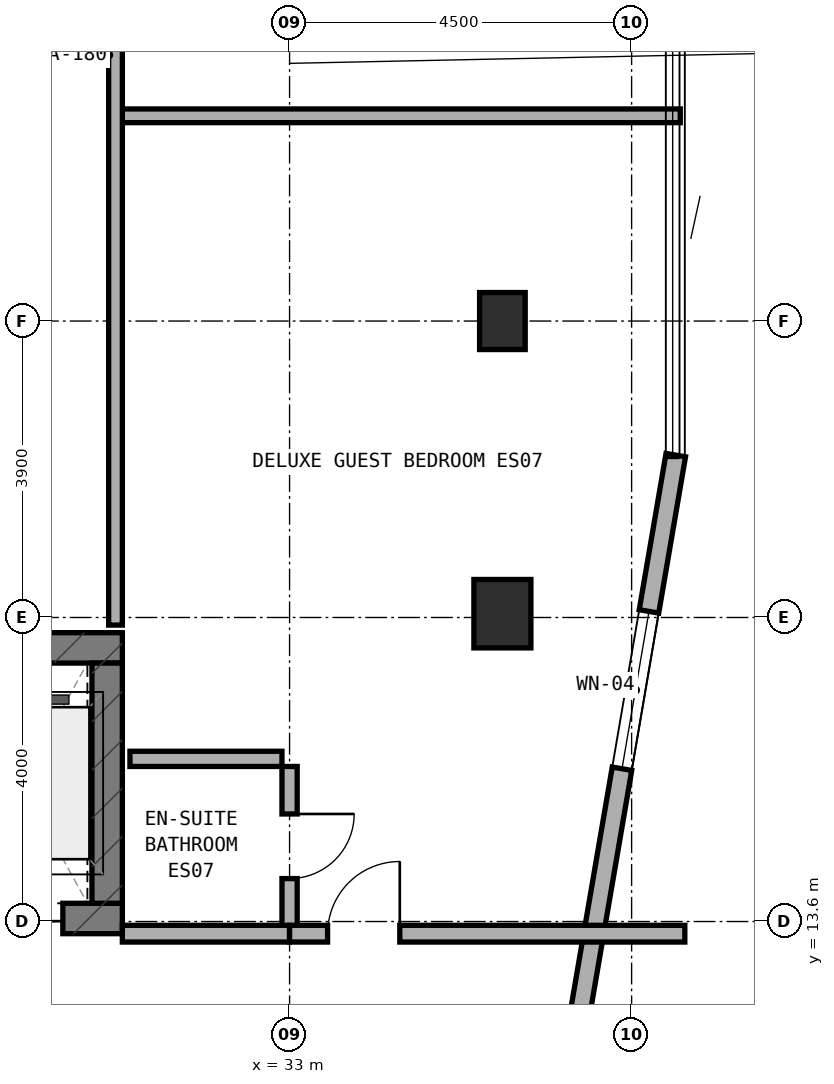
"""IFC4 building model, lengths in metres.
Left out: names, types, materials, properties, quantities, classifications, styles, units other than length and angle.
Written with IfcOpenShell. Run it as: python <this file> out.ifc"""

import sys

from ifc_helpers import new_model, si_unit, direction, frame, frame_2d, origin, origin_2d, place, context, subcontext, project, spatial, rectangle, extrude, element, fill, save


model = new_model("IFC4")
c1 = context("Model", 3, precision=1e-05, world=origin(), true_north=direction((0.0, 1.0)))
c2 = subcontext(c1, "Body", "Model", "MODEL_VIEW")
j1 = project(units=[si_unit("LENGTHUNIT", "METRE"), si_unit("PLANEANGLEUNIT", "RADIAN")], contexts=[c1])
p1 = place(None, origin())
s1 = spatial("IfcSite", under=j1, at=p1, CompositionType="ELEMENT")
p2 = place(p1, origin())
s2 = spatial("IfcBuilding", under=s1, at=p2, CompositionType="ELEMENT")
p3 = place(p2, frame((0.0, 0.0, 257.6)))
s3 = spatial("IfcBuildingStorey", under=s2, at=p3, CompositionType="ELEMENT", Elevation=257.6)
p4 = place(p3, frame((6.4, 13.64, 0.0), z_axis=(0.0, 0.0, 1.0), x_axis=(1.0, 0.0, 0.0)))
e1 = element("IfcWall", 1, at=p4, inside=s3, PredefinedType="SHEAR", context=c2, shape_type="SweptSolid", body=[
    extrude(rectangle(XDim=24.4, YDim=0.4, at=frame_2d((12.2, 0.0))), origin(), (0.0, 0.0, 1.0), 3.6),
])
p5 = place(p4, frame((9.15, 0.0, 0.0)))
e2 = element("IfcOpeningElement", 2, at=p5, cuts=e1, PredefinedType="OPENING", context=c2, shape_type="SweptSolid", body=[
    extrude(rectangle(XDim=1.2, YDim=2.15, at=frame_2d((0.6, 1.075))), frame((0.0, 0.21, 0.0), z_axis=(0.0, -1.0, 0.0), x_axis=(1.0, 0.0, 0.0)), (0.0, 0.0, 1.0), 0.42),
])
p6 = place(p4, frame((16.94, 0.0, 0.0)))
e3 = element("IfcOpeningElement", 3, at=p6, cuts=e1, PredefinedType="OPENING", context=c2, shape_type="SweptSolid", body=[
    extrude(rectangle(XDim=0.85, YDim=2.1, at=frame_2d((0.425, 1.05))), frame((0.0, 0.21, 0.0), z_axis=(0.0, -1.0, 0.0), x_axis=(1.0, 0.0, 0.0)), (0.0, 0.0, 1.0), 0.42),
])
p7 = place(p4, frame((18.783, 0.0, 0.0)))
e4 = element("IfcOpeningElement", 4, at=p7, cuts=e1, PredefinedType="OPENING", context=c2, shape_type="SweptSolid", body=[
    extrude(rectangle(XDim=1.1, YDim=2.15, at=frame_2d((0.55, 1.075))), frame((0.0, 0.21, 0.0), z_axis=(0.0, -1.0, 0.0), x_axis=(1.0, 0.0, 0.0)), (0.0, 0.0, 1.0), 0.42),
])
p8 = place(p4, frame((20.65, 0.0, 0.0)))
e5 = element("IfcOpeningElement", 5, at=p8, cuts=e1, PredefinedType="OPENING", context=c2, shape_type="SweptSolid", body=[
    extrude(rectangle(XDim=1.1, YDim=2.15, at=frame_2d((0.55, 1.075))), frame((0.0, 0.21, 0.0), z_axis=(0.0, -1.0, 0.0), x_axis=(1.0, 0.0, 0.0)), (0.0, 0.0, 1.0), 0.42),
])
p9 = place(p4, frame((22.517, 0.0, 0.0)))
e6 = element("IfcOpeningElement", 6, at=p9, cuts=e1, PredefinedType="OPENING", context=c2, shape_type="SweptSolid", body=[
    extrude(rectangle(XDim=1.1, YDim=2.15, at=frame_2d((0.55, 1.075))), frame((0.0, 0.21, 0.0), z_axis=(0.0, -1.0, 0.0), x_axis=(1.0, 0.0, 0.0)), (0.0, 0.0, 1.0), 0.42),
])
p10 = place(p3, frame((6.4, 17.2, 0.0), z_axis=(0.0, 0.0, 1.0), x_axis=(1.0, 0.0, 0.0)))
e7 = element("IfcWall", 7, at=p10, inside=s3, PredefinedType="SHEAR", context=c2, shape_type="SweptSolid", body=[
    extrude(rectangle(XDim=24.4, YDim=0.4, at=frame_2d((12.2, 0.0))), origin(), (0.0, 0.0, 1.0), 3.6),
])
p11 = place(p3, frame((30.6, 13.84, 0.0), z_axis=(0.0, 0.0, 1.0), x_axis=(0.0, 1.0, 0.0)))
e8 = element("IfcWall", 8, at=p11, inside=s3, PredefinedType="SHEAR", context=c2, shape_type="SweptSolid", body=[
    extrude(rectangle(XDim=3.16, YDim=0.4, at=frame_2d((1.58, 0.0))), origin(), (0.0, 0.0, 1.0), 3.6),
])
p12 = place(p3, frame((35.8, 21.5, 0.0), z_axis=(0.0, 0.0, 1.0), x_axis=(1.0, 0.0, 0.0)))
e9 = element("IfcColumn", 9, at=p12, inside=s3, PredefinedType="COLUMN", context=c2, shape_type="SweptSolid", body=[
    extrude(rectangle(XDim=0.6, YDim=0.75, at=origin_2d()), origin(), (0.0, 0.0, 1.0), 3.6),
])
p13 = place(p3, frame((35.8, 17.65, 0.0), z_axis=(0.0, 0.0, 1.0), x_axis=(1.0, 0.0, 0.0)))
e10 = element("IfcColumn", 10, at=p13, inside=s3, PredefinedType="COLUMN", context=c2, shape_type="SweptSolid", body=[
    extrude(rectangle(XDim=0.75, YDim=0.9, at=origin_2d()), origin(), (0.0, 0.0, 1.0), 3.6),
])
p14 = place(p3, frame((36.671, 11.514, 0.0), z_axis=(0.0, 0.0, 1.0), x_axis=(0.169038545376, 0.985609440994, 0.0)))
e11 = element("IfcWall", 11, at=p14, inside=s3, PredefinedType="STANDARD", context=c2, shape_type="SweptSolid", body=[
    extrude(rectangle(XDim=8.342, YDim=0.26, at=frame_2d((4.171, 0.0))), origin(), (0.0, 0.0, 1.0), 3.32),
])
p15 = place(p14, frame((4.156, 0.0, 0.85)))
e12 = element("IfcOpeningElement", 12, at=p15, cuts=e11, PredefinedType="OPENING", context=c2, shape_type="SweptSolid", body=[
    extrude(rectangle(XDim=2.1, YDim=1.5, at=frame_2d((1.05, 0.75))), frame((0.0, 0.14, 0.0), z_axis=(0.0, -1.0, 0.0), x_axis=(1.0, 0.0, 0.0)), (0.0, 0.0, 1.0), 0.28),
])
p16 = place(p3, frame((30.8, 24.2, 0.0), z_axis=(0.0, 0.0, 1.0), x_axis=(1.0, 0.0, 0.0)))
e13 = element("IfcWall", 13, at=p16, inside=s3, PredefinedType="SOLIDWALL", context=c2, shape_type="SweptSolid", body=[
    extrude(rectangle(XDim=7.34, YDim=0.18, at=frame_2d((3.67, 0.0))), origin(), (0.0, 0.0, 1.0), 3.015),
])
p17 = place(p3, frame((30.71, 17.5, 0.0), z_axis=(0.0, 0.0, 1.0), x_axis=(0.0, 1.0, 0.0)))
e14 = element("IfcWall", 14, at=p17, inside=s3, PredefinedType="SOLIDWALL", context=c2, shape_type="SweptSolid", body=[
    extrude(rectangle(XDim=15.0, YDim=0.18, at=frame_2d((7.5, 0.0))), origin(), (0.0, 0.0, 1.0), 2.795),
])
p18 = place(p3, frame((33.0, 13.54, 0.0), z_axis=(0.0, 0.0, 1.0), x_axis=(0.0, 1.0, 0.0)))
e15 = element("IfcWall", 15, at=p18, inside=s3, PredefinedType="PLUMBINGWALL", context=c2, shape_type="SweptSolid", body=[
    extrude(rectangle(XDim=2.1, YDim=0.2, at=frame_2d((1.05, 0.0))), origin(), (0.0, 0.0, 1.0), 3.32),
])
p19 = place(p18, frame((0.625, 0.0, 0.0)))
e16 = element("IfcOpeningElement", 16, at=p19, cuts=e15, PredefinedType="OPENING", context=c2, shape_type="SweptSolid", body=[
    extrude(rectangle(XDim=0.85, YDim=2.1, at=frame_2d((0.425, 1.05))), frame((0.0, 0.11, 0.0), z_axis=(0.0, -1.0, 0.0), x_axis=(1.0, 0.0, 0.0)), (0.0, 0.0, 1.0), 0.22),
])
p20 = place(p3, frame((30.9, 15.74, 0.0), z_axis=(0.0, 0.0, 1.0), x_axis=(1.0, 0.0, 0.0)))
e17 = element("IfcWall", 17, at=p20, inside=s3, PredefinedType="PLUMBINGWALL", context=c2, shape_type="SweptSolid", body=[
    extrude(rectangle(XDim=2.0, YDim=0.2, at=frame_2d((1.0, 0.0))), origin(), (0.0, 0.0, 1.0), 3.32),
])
p21 = place(p3, frame((30.8, 13.44, 0.0), z_axis=(0.0, 0.0, 1.0), x_axis=(1.0, 0.0, 0.0)))
e18 = element("IfcWall", 18, at=p21, inside=s3, PredefinedType="SOLIDWALL", context=c2, shape_type="SweptSolid", body=[
    extrude(rectangle(XDim=2.2, YDim=0.22, at=frame_2d((1.1, 0.0))), origin(), (0.0, 0.0, 1.0), 3.32),
])
p22 = place(p3, frame((33.0, 13.44, 0.0), z_axis=(0.0, 0.0, 1.0), x_axis=(1.0, 0.0, 0.0)))
e19 = element("IfcWall", 19, at=p22, inside=s3, PredefinedType="SOLIDWALL", context=c2, shape_type="SweptSolid", body=[
    extrude(rectangle(XDim=5.2, YDim=0.22, at=frame_2d((2.6, 0.0))), origin(), (0.0, 0.0, 1.0), 2.795),
])
p23 = place(p22, frame((0.5, 0.0, 0.0)))
e20 = element("IfcOpeningElement", 20, at=p23, cuts=e19, PredefinedType="OPENING", context=c2, shape_type="SweptSolid", body=[
    extrude(rectangle(XDim=0.95, YDim=2.1, at=frame_2d((0.475, 1.05))), frame((0.0, 0.12, 0.0), z_axis=(0.0, -1.0, 0.0), x_axis=(1.0, 0.0, 0.0)), (0.0, 0.0, 1.0), 0.24),
])
p24 = place(p15, origin())
e21 = element("IfcWindow", 21, at=p24, inside=s3, PartitioningType="SINGLE_PANEL", PredefinedType="WINDOW", context=c2, shape_type="SweptSolid", body=[
    extrude(rectangle(XDim=2.1, YDim=1.5, at=frame_2d((1.05, 0.75))), frame((0.0, 0.03, 0.0), z_axis=(0.0, -1.0, 0.0), x_axis=(1.0, 0.0, 0.0)), (0.0, 0.0, 1.0), 0.06),
])
fill(e12, e21)
p25 = place(p9, frame((1.1, 0.0, 0.0), z_axis=(0.0, 0.0, 1.0), x_axis=(-1.0, 0.0, 0.0)))
e22 = element("IfcDoor", 22, at=p25, inside=s3, OperationType="DOUBLE_DOOR_SLIDING", PredefinedType="DOOR", context=c2, shape_type="SweptSolid", body=[
    extrude(rectangle(XDim=1.1, YDim=2.15, at=frame_2d((0.55, 1.075))), frame((0.0, 0.025, 0.0), z_axis=(0.0, -1.0, 0.0), x_axis=(1.0, 0.0, 0.0)), (0.0, 0.0, 1.0), 0.05),
])
fill(e6, e22)
p26 = place(p19, frame((0.85, 0.0, 0.0), z_axis=(0.0, 0.0, 1.0), x_axis=(-1.0, 0.0, 0.0)))
e23 = element("IfcDoor", 23, at=p26, inside=s3, OperationType="SINGLE_SWING_LEFT", PredefinedType="DOOR", context=c2, shape_type="SweptSolid", body=[
    extrude(rectangle(XDim=0.85, YDim=2.1, at=frame_2d((0.425, 1.05))), frame((0.0, 0.025, 0.0), z_axis=(0.0, -1.0, 0.0), x_axis=(1.0, 0.0, 0.0)), (0.0, 0.0, 1.0), 0.05),
])
fill(e16, e23)
p27 = place(p23, origin())
e24 = element("IfcDoor", 24, at=p27, inside=s3, OperationType="SINGLE_SWING_RIGHT", PredefinedType="DOOR", context=c2, shape_type="SweptSolid", body=[
    extrude(rectangle(XDim=0.95, YDim=2.1, at=frame_2d((0.475, 1.05))), frame((0.0, 0.025, 0.0), z_axis=(0.0, -1.0, 0.0), x_axis=(1.0, 0.0, 0.0)), (0.0, 0.0, 1.0), 0.05),
])
fill(e20, e24)
save(model, sys.argv[1])
